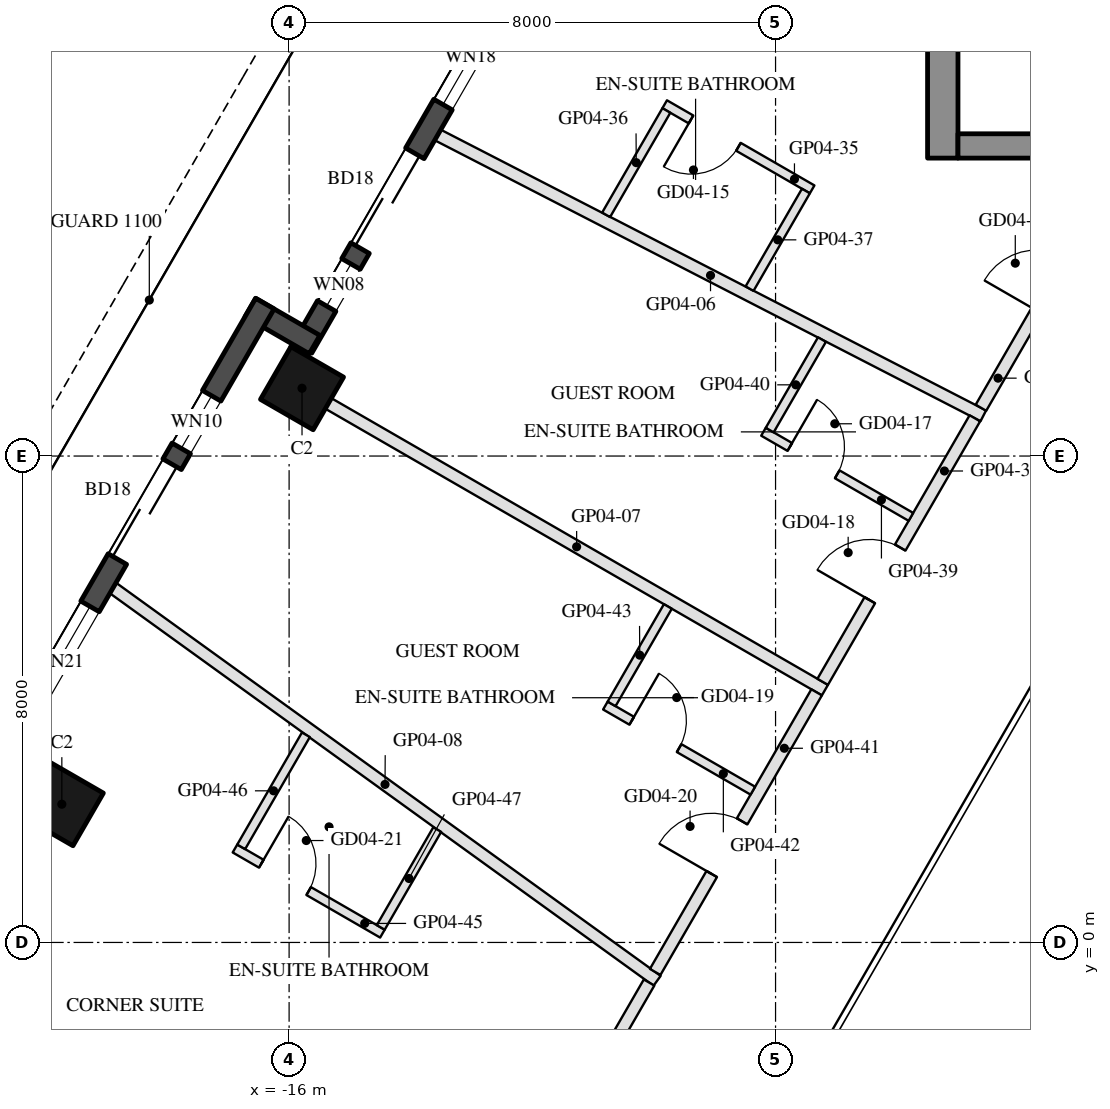
"""IFC4 building model, lengths in metres.
Left out: names, types, materials, properties, quantities, classifications, styles, units other than length and angle.
Written with IfcOpenShell. Run it as: python <this file> out.ifc"""

import sys

from ifc_helpers import new_model, si_unit, direction, frame, frame_2d, origin, origin_2d, place, context, subcontext, project, spatial, rectangle, hollow_rectangle, extrude, element, fill, save


model = new_model("IFC4")
c1 = context("Model", 3, precision=1e-05, world=origin(), true_north=direction((0.0, 1.0)))
c2 = subcontext(c1, "Body", "Model", "MODEL_VIEW")
j1 = project(units=[si_unit("LENGTHUNIT", "METRE"), si_unit("PLANEANGLEUNIT", "RADIAN")], contexts=[c1])
p1 = place(None, origin())
s1 = spatial("IfcSite", under=j1, at=p1, CompositionType="ELEMENT")
p2 = place(p1, origin())
s2 = spatial("IfcBuilding", under=s1, at=p2, CompositionType="ELEMENT")
p3 = place(p2, frame((0.0, 0.0, 76.1)))
s3 = spatial("IfcBuildingStorey", under=s2, at=p3, CompositionType="ELEMENT", Elevation=76.1)
for number, where, z_axis, x_axis in (
    (1, (-15.788, 9.115, 0.0), (0.0, 0.0, 1.0), (0.5, 0.866, 0.0)),
    (2, (-19.738, 2.273, 0.0), (0.0, 0.0, 1.0), (0.5, 0.866, 0.0)),
):
    element("IfcColumn", number, at=place(p3, frame(where, z_axis=z_axis, x_axis=x_axis)), inside=s3, PredefinedType="COLUMN", context=c2, shape_type="SweptSolid", body=[
        extrude(hollow_rectangle(XDim=1.0, YDim=1.0, WallThickness=0.045, at=origin_2d()), origin(), (0.0, 0.0, 1.0), 3.7),
    ])
p4 = place(p3, frame((-12.409, 15.617, 0.0), z_axis=(0.0, 0.0, 1.0), x_axis=(-0.500003597184, -0.866023326939, 0.0)))
e3 = element("IfcWall", 3, at=p4, inside=s3, PredefinedType="SOLIDWALL", context=c2, shape_type="SweptSolid", body=[
    extrude(rectangle(XDim=6.74, YDim=0.35, at=frame_2d((3.37, 0.0))), origin(), (0.0, 0.0, 1.0), 3.55),
])
p5 = place(p4, frame((0.32, 0.0, 0.3)))
e4 = element("IfcOpeningElement", 4, at=p5, cuts=e3, PredefinedType="OPENING", context=c2, shape_type="SweptSolid", body=[
    extrude(rectangle(XDim=1.8, YDim=2.65, at=frame_2d((0.9, 1.325))), frame((0.0, 0.185, 0.0), z_axis=(0.0, -1.0, 0.0), x_axis=(1.0, 0.0, 0.0)), (0.0, 0.0, 1.0), 0.37),
])
p6 = place(p4, frame((3.047, 0.0, 0.0)))
e5 = element("IfcOpeningElement", 5, at=p6, cuts=e3, PredefinedType="OPENING", context=c2, shape_type="SweptSolid", body=[
    extrude(rectangle(XDim=1.8, YDim=2.4, at=frame_2d((0.9, 1.2))), frame((0.0, 0.185, 0.0), z_axis=(0.0, -1.0, 0.0), x_axis=(1.0, 0.0, 0.0)), (0.0, 0.0, 1.0), 0.37),
])
p7 = place(p4, frame((5.147, 0.0, 0.3)))
e6 = element("IfcOpeningElement", 6, at=p7, cuts=e3, PredefinedType="OPENING", context=c2, shape_type="SweptSolid", body=[
    extrude(rectangle(XDim=0.8, YDim=2.65, at=frame_2d((0.4, 1.325))), frame((0.0, 0.185, 0.0), z_axis=(0.0, -1.0, 0.0), x_axis=(1.0, 0.0, 0.0)), (0.0, 0.0, 1.0), 0.37),
])
p8 = place(p3, frame((-15.581, 9.833, 0.0), z_axis=(0.0, 0.0, 1.0), x_axis=(-0.866055662726, 0.499947586314, 0.0)))
e7 = element("IfcWall", 7, at=p8, inside=s3, PredefinedType="SOLIDWALL", context=c2, shape_type="SweptSolid", body=[
    extrude(rectangle(XDim=1.22, YDim=0.35, at=frame_2d((0.61, 0.0))), origin(), (0.0, 0.0, 1.0), 3.55),
])
p9 = place(p3, frame((-16.398, 10.507, 0.0), z_axis=(0.0, 0.0, 1.0), x_axis=(-0.499999142773, -0.866025898704, 0.0)))
e8 = element("IfcWall", 8, at=p9, inside=s3, PredefinedType="SOLIDWALL", context=c2, shape_type="SweptSolid", body=[
    extrude(rectangle(XDim=9.7, YDim=0.35, at=frame_2d((4.85, 0.0))), origin(), (0.0, 0.0, 1.0), 3.55),
])
p10 = place(p9, frame((3.051, 0.0, 0.0)))
e9 = element("IfcOpeningElement", 9, at=p10, cuts=e8, PredefinedType="OPENING", context=c2, shape_type="SweptSolid", body=[
    extrude(rectangle(XDim=1.8, YDim=2.4, at=frame_2d((0.9, 1.2))), frame((0.0, 0.185, 0.0), z_axis=(0.0, -1.0, 0.0), x_axis=(1.0, 0.0, 0.0)), (0.0, 0.0, 1.0), 0.37),
])
p11 = place(p9, frame((1.75, 0.0, 0.3)))
e10 = element("IfcOpeningElement", 10, at=p11, cuts=e8, PredefinedType="OPENING", context=c2, shape_type="SweptSolid", body=[
    extrude(rectangle(XDim=1.0, YDim=2.65, at=frame_2d((0.5, 1.325))), frame((0.0, 0.185, 0.0), z_axis=(0.0, -1.0, 0.0), x_axis=(1.0, 0.0, 0.0)), (0.0, 0.0, 1.0), 0.37),
])
p12 = place(p9, frame((5.751, 0.0, 0.3)))
e11 = element("IfcOpeningElement", 11, at=p12, cuts=e8, PredefinedType="OPENING", context=c2, shape_type="SweptSolid", body=[
    extrude(rectangle(XDim=2.1, YDim=2.65, at=frame_2d((1.05, 1.325))), frame((0.0, 0.185, 0.0), z_axis=(0.0, -1.0, 0.0), x_axis=(1.0, 0.0, 0.0)), (0.0, 0.0, 1.0), 0.37),
])
p13 = place(p3, frame((-5.25, 12.9, 0.0), z_axis=(0.0, 0.0, 1.0), x_axis=(0.0, 1.0, 0.0)))
e12 = element("IfcWall", 12, at=p13, inside=s3, PredefinedType="SHEAR", context=c2, shape_type="SweptSolid", body=[
    extrude(rectangle(XDim=14.837, YDim=0.5, at=frame_2d((7.418, 0.0))), origin(), (0.0, 0.0, 1.0), 3.5),
])
p14 = place(p3, frame((5.0, 13.1, 0.0), z_axis=(0.0, 0.0, 1.0), x_axis=(-1.0, 0.0, 0.0)))
e13 = element("IfcWall", 13, at=p14, inside=s3, PredefinedType="SHEAR", context=c2, shape_type="SweptSolid", body=[
    extrude(rectangle(XDim=10.0, YDim=0.4, at=frame_2d((5.0, 0.0))), origin(), (0.0, 0.0, 1.0), 3.5),
])
p15 = place(p14, frame((3.55, 0.0, 0.0)))
e14 = element("IfcOpeningElement", 14, at=p15, cuts=e13, PredefinedType="OPENING", context=c2, shape_type="SweptSolid", body=[
    extrude(rectangle(XDim=1.1, YDim=2.1, at=frame_2d((0.55, 1.05))), frame((0.0, 0.21, 0.0), z_axis=(0.0, -1.0, 0.0), x_axis=(1.0, 0.0, 0.0)), (0.0, 0.0, 1.0), 0.42),
])
p16 = place(p14, frame((5.85, 0.0, 0.0)))
e15 = element("IfcOpeningElement", 15, at=p16, cuts=e13, PredefinedType="OPENING", context=c2, shape_type="SweptSolid", body=[
    extrude(rectangle(XDim=1.4, YDim=2.1, at=frame_2d((0.7, 1.05))), frame((0.0, 0.21, 0.0), z_axis=(0.0, -1.0, 0.0), x_axis=(1.0, 0.0, 0.0)), (0.0, 0.0, 1.0), 0.42),
])
p17 = place(p3, frame((-13.556, 13.281, 0.0), z_axis=(0.0, 0.0, 1.0), x_axis=(0.889110909618, -0.457691807223, 0.0)))
e16 = element("IfcWall", 16, at=p17, inside=s3, PredefinedType="PARTITIONING", context=c2, shape_type="SweptSolid", body=[
    extrude(rectangle(XDim=10.092, YDim=0.2, at=frame_2d((5.046, 0.0))), origin(), (0.0, 0.0, 1.0), 2.96),
])
p18 = place(p3, frame((-15.354, 8.865, 0.0), z_axis=(0.0, 0.0, 1.0), x_axis=(0.866018301787, -0.500012300819, 0.0)))
e17 = element("IfcWall", 17, at=p18, inside=s3, PredefinedType="PARTITIONING", context=c2, shape_type="SweptSolid", body=[
    extrude(rectangle(XDim=9.43, YDim=0.2, at=frame_2d((4.715, 0.0))), origin(), (0.0, 0.0, 1.0), 2.95),
])
p19 = place(p3, frame((-18.897, 5.83, 0.0), z_axis=(0.0, 0.0, 1.0), x_axis=(0.810787705843, -0.585340324985, 0.0)))
e18 = element("IfcWall", 18, at=p19, inside=s3, PredefinedType="PARTITIONING", context=c2, shape_type="SweptSolid", body=[
    extrude(rectangle(XDim=11.037, YDim=0.2, at=frame_2d((5.519, 0.0))), origin(), (0.0, 0.0, 1.0), 2.96),
])
p20 = place(p3, frame((-4.622, 8.794, 0.0), z_axis=(0.0, 0.0, 1.0), x_axis=(0.499979668266, 0.866037141998, 0.0)))
e19 = element("IfcWall", 19, at=p20, inside=s3, PredefinedType="PARTITIONING", context=c2, shape_type="SweptSolid", body=[
    extrude(rectangle(XDim=4.683, YDim=0.2, at=frame_2d((2.342, 0.0))), origin(), (0.0, 0.0, 1.0), 2.95),
])
p21 = place(p20, frame((1.842, 0.0, 0.0)))
e20 = element("IfcOpeningElement", 20, at=p21, cuts=e19, PredefinedType="OPENING", context=c2, shape_type="SweptSolid", body=[
    extrude(rectangle(XDim=1.0, YDim=2.1, at=frame_2d((0.5, 1.05))), frame((0.0, 0.11, 0.0), z_axis=(0.0, -1.0, 0.0), x_axis=(1.0, 0.0, 0.0)), (0.0, 0.0, 1.0), 0.22),
])
p22 = place(p3, frame((-7.398, 12.386, 0.0), z_axis=(0.0, 0.0, 1.0), x_axis=(-0.866034573852, 0.49998411664, 0.0)))
e21 = element("IfcWall", 21, at=p22, inside=s3, PredefinedType="PARTITIONING", context=c2, shape_type="SweptSolid", body=[
    extrude(rectangle(XDim=2.8, YDim=0.15, at=frame_2d((1.4, 0.0))), origin(), (0.0, 0.0, 1.0), 3.55),
])
p23 = place(p22, frame((1.4, 0.0, 0.0)))
e22 = element("IfcOpeningElement", 22, at=p23, cuts=e21, PredefinedType="OPENING", context=c2, shape_type="SweptSolid", body=[
    extrude(rectangle(XDim=0.9, YDim=2.1, at=frame_2d((0.45, 1.05))), frame((0.0, 0.085, 0.0), z_axis=(0.0, -1.0, 0.0), x_axis=(1.0, 0.0, 0.0)), (0.0, 0.0, 1.0), 0.17),
])
p24 = place(p3, frame((-9.796, 13.683, 0.0), z_axis=(0.0, 0.0, 1.0), x_axis=(-0.499981976687, -0.866035809299, 0.0)))
e23 = element("IfcWall", 23, at=p24, inside=s3, PredefinedType="PARTITIONING", context=c2, shape_type="SweptSolid", body=[
    extrude(rectangle(XDim=1.981, YDim=0.15, at=frame_2d((0.991, 0.0))), origin(), (0.0, 0.0, 1.0), 3.55),
])
p25 = place(p3, frame((-7.501, 12.358, 0.0), z_axis=(0.0, 0.0, 1.0), x_axis=(-0.499992292652, -0.866029853578, 0.0)))
e24 = element("IfcWall", 24, at=p25, inside=s3, PredefinedType="PARTITIONING", context=c2, shape_type="SweptSolid", body=[
    extrude(rectangle(XDim=1.854, YDim=0.15, at=frame_2d((0.927, 0.0))), origin(), (0.0, 0.0, 1.0), 3.55),
])
p26 = place(p3, frame((-7.225, 4.287, 0.0), z_axis=(0.0, 0.0, 1.0), x_axis=(0.49997441339, 0.866040175716, 0.0)))
e25 = element("IfcWall", 25, at=p26, inside=s3, PredefinedType="PARTITIONING", context=c2, shape_type="SweptSolid", body=[
    extrude(rectangle(XDim=5.005, YDim=0.2, at=frame_2d((2.502, 0.0))), origin(), (0.0, 0.0, 1.0), 2.95),
])
p27 = place(p26, frame((1.55, 0.0, 0.0)))
e26 = element("IfcOpeningElement", 26, at=p27, cuts=e25, PredefinedType="OPENING", context=c2, shape_type="SweptSolid", body=[
    extrude(rectangle(XDim=1.0, YDim=2.1, at=frame_2d((0.5, 1.05))), frame((0.0, 0.11, 0.0), z_axis=(0.0, -1.0, 0.0), x_axis=(1.0, 0.0, 0.0)), (0.0, 0.0, 1.0), 0.22),
])
p28 = place(p3, frame((-8.198, 8.399, 0.0), z_axis=(0.0, 0.0, 1.0), x_axis=(0.866034573852, -0.49998411664, 0.0)))
e27 = element("IfcWall", 27, at=p28, inside=s3, PredefinedType="PARTITIONING", context=c2, shape_type="SweptSolid", body=[
    extrude(rectangle(XDim=2.8, YDim=0.15, at=frame_2d((1.4, 0.0))), origin(), (0.0, 0.0, 1.0), 3.55),
])
p29 = place(p28, frame((0.5, 0.0, 0.0)))
e28 = element("IfcOpeningElement", 28, at=p29, cuts=e27, PredefinedType="OPENING", context=c2, shape_type="SweptSolid", body=[
    extrude(rectangle(XDim=0.9, YDim=2.1, at=frame_2d((0.45, 1.05))), frame((0.0, 0.085, 0.0), z_axis=(0.0, -1.0, 0.0), x_axis=(1.0, 0.0, 0.0)), (0.0, 0.0, 1.0), 0.17),
])
p30 = place(p3, frame((-7.237, 9.915, 0.0), z_axis=(0.0, 0.0, 1.0), x_axis=(-0.50005036918, -0.865996321171, 0.0)))
e29 = element("IfcWall", 29, at=p30, inside=s3, PredefinedType="PARTITIONING", context=c2, shape_type="SweptSolid", body=[
    extrude(rectangle(XDim=1.719, YDim=0.15, at=frame_2d((0.859, 0.0))), origin(), (0.0, 0.0, 1.0), 2.95),
])
p31 = place(p3, frame((-9.979, -0.485, 0.0), z_axis=(0.0, 0.0, 1.0), x_axis=(0.500006381002, 0.86602171968, 0.0)))
e30 = element("IfcWall", 30, at=p31, inside=s3, PredefinedType="PARTITIONING", context=c2, shape_type="SweptSolid", body=[
    extrude(rectangle(XDim=5.31, YDim=0.2, at=frame_2d((2.655, 0.0))), origin(), (0.0, 0.0, 1.0), 2.95),
])
p32 = place(p31, frame((1.86, 0.0, 0.0)))
e31 = element("IfcOpeningElement", 31, at=p32, cuts=e30, PredefinedType="OPENING", context=c2, shape_type="SweptSolid", body=[
    extrude(rectangle(XDim=1.0, YDim=2.1, at=frame_2d((0.5, 1.05))), frame((0.0, 0.11, 0.0), z_axis=(0.0, -1.0, 0.0), x_axis=(1.0, 0.0, 0.0)), (0.0, 0.0, 1.0), 0.22),
])
p33 = place(p3, frame((-10.799, 3.896, 0.0), z_axis=(0.0, 0.0, 1.0), x_axis=(0.866034573852, -0.49998411664, 0.0)))
e32 = element("IfcWall", 32, at=p33, inside=s3, PredefinedType="PARTITIONING", context=c2, shape_type="SweptSolid", body=[
    extrude(rectangle(XDim=2.8, YDim=0.15, at=frame_2d((1.4, 0.0))), origin(), (0.0, 0.0, 1.0), 3.55),
])
p34 = place(p33, frame((0.5, 0.0, 0.0)))
e33 = element("IfcOpeningElement", 33, at=p34, cuts=e32, PredefinedType="OPENING", context=c2, shape_type="SweptSolid", body=[
    extrude(rectangle(XDim=0.9, YDim=2.1, at=frame_2d((0.45, 1.05))), frame((0.0, 0.085, 0.0), z_axis=(0.0, -1.0, 0.0), x_axis=(1.0, 0.0, 0.0)), (0.0, 0.0, 1.0), 0.17),
])
p35 = place(p3, frame((-9.771, 5.526, 0.0), z_axis=(0.0, 0.0, 1.0), x_axis=(-0.500042316284, -0.866000971088, 0.0)))
e34 = element("IfcWall", 34, at=p35, inside=s3, PredefinedType="PARTITIONING", context=c2, shape_type="SweptSolid", body=[
    extrude(rectangle(XDim=1.85, YDim=0.15, at=frame_2d((0.925, 0.0))), origin(), (0.0, 0.0, 1.0), 2.95),
])
p36 = place(p3, frame((-12.269, -4.45, 0.0), z_axis=(0.0, 0.0, 1.0), x_axis=(0.499996027077, 0.86602769754, 0.0)))
e35 = element("IfcWall", 35, at=p36, inside=s3, PredefinedType="PARTITIONING", context=c2, shape_type="SweptSolid", body=[
    extrude(rectangle(XDim=4.377, YDim=0.2, at=frame_2d((2.189, 0.0))), origin(), (0.0, 0.0, 1.0), 2.95),
])
p37 = place(p36, frame((1.689, 0.0, 0.0)))
e36 = element("IfcOpeningElement", 36, at=p37, cuts=e35, PredefinedType="OPENING", context=c2, shape_type="SweptSolid", body=[
    extrude(rectangle(XDim=1.0, YDim=2.1, at=frame_2d((0.5, 1.05))), frame((0.0, 0.11, 0.0), z_axis=(0.0, -1.0, 0.0), x_axis=(1.0, 0.0, 0.0)), (0.0, 0.0, 1.0), 0.22),
])
p38 = place(p3, frame((-16.89, 1.545, 0.0), z_axis=(0.0, 0.0, 1.0), x_axis=(0.866034573852, -0.49998411664, 0.0)))
e37 = element("IfcWall", 37, at=p38, inside=s3, PredefinedType="PARTITIONING", context=c2, shape_type="SweptSolid", body=[
    extrude(rectangle(XDim=2.8, YDim=0.15, at=frame_2d((1.4, 0.0))), origin(), (0.0, 0.0, 1.0), 3.55),
])
p39 = place(p38, frame((0.5, 0.0, 0.0)))
e38 = element("IfcOpeningElement", 38, at=p39, cuts=e37, PredefinedType="OPENING", context=c2, shape_type="SweptSolid", body=[
    extrude(rectangle(XDim=0.9, YDim=2.1, at=frame_2d((0.45, 1.05))), frame((0.0, 0.085, 0.0), z_axis=(0.0, -1.0, 0.0), x_axis=(1.0, 0.0, 0.0)), (0.0, 0.0, 1.0), 0.17),
])
p40 = place(p3, frame((-15.724, 3.415, 0.0), z_axis=(0.0, 0.0, 1.0), x_axis=(-0.50001378257, -0.866017446268, 0.0)))
e39 = element("IfcWall", 39, at=p40, inside=s3, PredefinedType="PARTITIONING", context=c2, shape_type="SweptSolid", body=[
    extrude(rectangle(XDim=2.128, YDim=0.15, at=frame_2d((1.064, 0.0))), origin(), (0.0, 0.0, 1.0), 3.55),
])
p41 = place(p3, frame((-13.564, 1.856, 0.0), z_axis=(0.0, 0.0, 1.0), x_axis=(-0.499984136491, -0.866034562392, 0.0)))
e40 = element("IfcWall", 40, at=p41, inside=s3, PredefinedType="PARTITIONING", context=c2, shape_type="SweptSolid", body=[
    extrude(rectangle(XDim=1.857, YDim=0.15, at=frame_2d((0.929, 0.0))), origin(), (0.0, 0.0, 1.0), 3.55),
])
p42 = place(p5, origin())
e41 = element("IfcWindow", 41, at=p42, inside=s3, PartitioningType="SINGLE_PANEL", PredefinedType="WINDOW", context=c2, shape_type="SweptSolid", body=[
    extrude(rectangle(XDim=1.8, YDim=2.65, at=frame_2d((0.9, 1.325))), frame((0.0, 0.03, 0.0), z_axis=(0.0, -1.0, 0.0), x_axis=(1.0, 0.0, 0.0)), (0.0, 0.0, 1.0), 0.06),
])
fill(e4, e41)
p43 = place(p6, frame((1.8, 0.0, 0.0), z_axis=(0.0, 0.0, 1.0), x_axis=(-1.0, 0.0, 0.0)))
e42 = element("IfcDoor", 42, at=p43, inside=s3, OperationType="SLIDING_TO_LEFT", PredefinedType="DOOR", context=c2, shape_type="SweptSolid", body=[
    extrude(rectangle(XDim=1.8, YDim=2.4, at=frame_2d((0.9, 1.2))), frame((0.0, 0.025, 0.0), z_axis=(0.0, -1.0, 0.0), x_axis=(1.0, 0.0, 0.0)), (0.0, 0.0, 1.0), 0.05),
])
fill(e5, e42)
p44 = place(p7, origin())
e43 = element("IfcWindow", 43, at=p44, inside=s3, PartitioningType="SINGLE_PANEL", PredefinedType="WINDOW", context=c2, shape_type="SweptSolid", body=[
    extrude(rectangle(XDim=0.8, YDim=2.65, at=frame_2d((0.4, 1.325))), frame((0.0, 0.03, 0.0), z_axis=(0.0, -1.0, 0.0), x_axis=(1.0, 0.0, 0.0)), (0.0, 0.0, 1.0), 0.06),
])
fill(e6, e43)
p45 = place(p10, frame((1.8, 0.0, 0.0), z_axis=(0.0, 0.0, 1.0), x_axis=(-1.0, 0.0, 0.0)))
e44 = element("IfcDoor", 44, at=p45, inside=s3, OperationType="SLIDING_TO_LEFT", PredefinedType="DOOR", context=c2, shape_type="SweptSolid", body=[
    extrude(rectangle(XDim=1.8, YDim=2.4, at=frame_2d((0.9, 1.2))), frame((0.0, 0.025, 0.0), z_axis=(0.0, -1.0, 0.0), x_axis=(1.0, 0.0, 0.0)), (0.0, 0.0, 1.0), 0.05),
])
fill(e9, e44)
p46 = place(p11, origin())
e45 = element("IfcWindow", 45, at=p46, inside=s3, PartitioningType="SINGLE_PANEL", PredefinedType="WINDOW", context=c2, shape_type="SweptSolid", body=[
    extrude(rectangle(XDim=1.0, YDim=2.65, at=frame_2d((0.5, 1.325))), frame((0.0, 0.03, 0.0), z_axis=(0.0, -1.0, 0.0), x_axis=(1.0, 0.0, 0.0)), (0.0, 0.0, 1.0), 0.06),
])
fill(e10, e45)
p47 = place(p12, origin())
e46 = element("IfcWindow", 46, at=p47, inside=s3, PartitioningType="SINGLE_PANEL", PredefinedType="WINDOW", context=c2, shape_type="SweptSolid", body=[
    extrude(rectangle(XDim=2.1, YDim=2.65, at=frame_2d((1.05, 1.325))), frame((0.0, 0.03, 0.0), z_axis=(0.0, -1.0, 0.0), x_axis=(1.0, 0.0, 0.0)), (0.0, 0.0, 1.0), 0.06),
])
fill(e11, e46)
p48 = place(p23, origin())
e47 = element("IfcDoor", 47, at=p48, inside=s3, OperationType="SINGLE_SWING_RIGHT", PredefinedType="DOOR", context=c2, shape_type="SweptSolid", body=[
    extrude(rectangle(XDim=0.9, YDim=2.1, at=frame_2d((0.45, 1.05))), frame((0.0, 0.025, 0.0), z_axis=(0.0, -1.0, 0.0), x_axis=(1.0, 0.0, 0.0)), (0.0, 0.0, 1.0), 0.05),
])
fill(e22, e47)
p49 = place(p29, origin())
e48 = element("IfcDoor", 48, at=p49, inside=s3, OperationType="SINGLE_SWING_LEFT", PredefinedType="DOOR", context=c2, shape_type="SweptSolid", body=[
    extrude(rectangle(XDim=0.9, YDim=2.1, at=frame_2d((0.45, 1.05))), frame((0.0, 0.025, 0.0), z_axis=(0.0, -1.0, 0.0), x_axis=(1.0, 0.0, 0.0)), (0.0, 0.0, 1.0), 0.05),
])
fill(e28, e48)
p50 = place(p27, origin())
e49 = element("IfcDoor", 49, at=p50, inside=s3, OperationType="SINGLE_SWING_LEFT", PredefinedType="DOOR", context=c2, shape_type="SweptSolid", body=[
    extrude(rectangle(XDim=1.0, YDim=2.1, at=frame_2d((0.5, 1.05))), frame((0.0, 0.025, 0.0), z_axis=(0.0, -1.0, 0.0), x_axis=(1.0, 0.0, 0.0)), (0.0, 0.0, 1.0), 0.05),
])
fill(e26, e49)
p51 = place(p34, origin())
e50 = element("IfcDoor", 50, at=p51, inside=s3, OperationType="SINGLE_SWING_LEFT", PredefinedType="DOOR", context=c2, shape_type="SweptSolid", body=[
    extrude(rectangle(XDim=0.9, YDim=2.1, at=frame_2d((0.45, 1.05))), frame((0.0, 0.025, 0.0), z_axis=(0.0, -1.0, 0.0), x_axis=(1.0, 0.0, 0.0)), (0.0, 0.0, 1.0), 0.05),
])
fill(e33, e50)
p52 = place(p32, origin())
e51 = element("IfcDoor", 51, at=p52, inside=s3, OperationType="SINGLE_SWING_LEFT", PredefinedType="DOOR", context=c2, shape_type="SweptSolid", body=[
    extrude(rectangle(XDim=1.0, YDim=2.1, at=frame_2d((0.5, 1.05))), frame((0.0, 0.025, 0.0), z_axis=(0.0, -1.0, 0.0), x_axis=(1.0, 0.0, 0.0)), (0.0, 0.0, 1.0), 0.05),
])
fill(e31, e51)
p53 = place(p39, origin())
e52 = element("IfcDoor", 52, at=p53, inside=s3, OperationType="SINGLE_SWING_LEFT", PredefinedType="DOOR", context=c2, shape_type="SweptSolid", body=[
    extrude(rectangle(XDim=0.9, YDim=2.1, at=frame_2d((0.45, 1.05))), frame((0.0, 0.025, 0.0), z_axis=(0.0, -1.0, 0.0), x_axis=(1.0, 0.0, 0.0)), (0.0, 0.0, 1.0), 0.05),
])
fill(e38, e52)
save(model, sys.argv[1])
